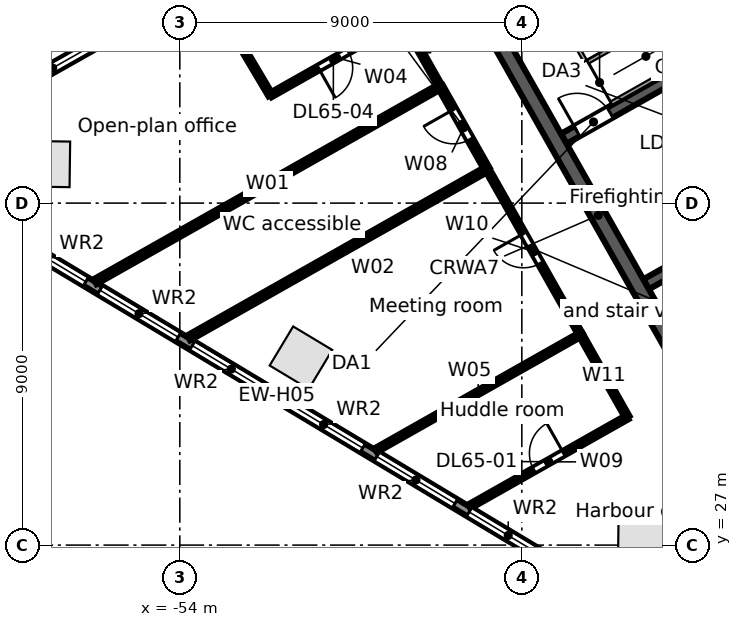
"""IFC4 building model, lengths in metres.
Left out: names, types, materials, properties, quantities, classifications, styles, units other than length and angle.
Written with IfcOpenShell. Run it as: python <this file> out.ifc"""

import sys

from ifc_helpers import new_model, si_unit, direction, frame, frame_2d, origin, origin_2d, place, context, subcontext, project, spatial, rectangle, extrude, element, fill, save


model = new_model("IFC4")
c1 = context("Model", 3, precision=1e-05, world=origin(), true_north=direction((0.0, 1.0)))
c2 = subcontext(c1, "Body", "Model", "MODEL_VIEW")
j1 = project(units=[si_unit("LENGTHUNIT", "METRE"), si_unit("PLANEANGLEUNIT", "RADIAN")], contexts=[c1])
p1 = place(None, origin())
s1 = spatial("IfcSite", under=j1, at=p1, CompositionType="ELEMENT")
p2 = place(p1, origin())
s2 = spatial("IfcBuilding", under=s1, at=p2, CompositionType="ELEMENT")
p3 = place(p2, frame((0.0, 0.0, 300.7)))
s3 = spatial("IfcBuildingStorey", under=s2, at=p3, CompositionType="ELEMENT", Elevation=300.7)
for number, where, z_axis, x_axis in (
    (1, (-57.493, 37.027, 0.0), (0.0, 0.0, 1.0), (-0.013, -1.0, 0.0)),
    (2, (-50.812, 31.931, 0.0), (0.0, 0.0, 1.0), (0.857, -0.515, 0.0)),
    (3, (-41.858, 27.495, 0.0), (0.0, 0.0, 1.0), (1.0, -0.013, 0.0)),
):
    element("IfcColumn", number, at=place(p3, frame(where, z_axis=z_axis, x_axis=x_axis)), inside=s3, PredefinedType="COLUMN", context=c2, shape_type="SweptSolid", body=[
        extrude(rectangle(XDim=1.2, YDim=1.2, at=origin_2d()), origin(), (0.0, 0.0, 1.0), 3.8),
    ])
p4 = place(p3, frame((-58.732, 38.771, 0.0), z_axis=(0.0, 0.0, 1.0), x_axis=(0.870355615581, 0.492423702137, 0.0)))
e4 = element("IfcWall", 4, at=p4, inside=s3, PredefinedType="STANDARD", context=c2, shape_type="SweptSolid", body=[
    extrude(rectangle(XDim=64.052, YDim=0.25, at=frame_2d((32.026, 0.0))), origin(), (0.0, 0.0, 1.0), 3.52),
])
p5 = place(p4, frame((61.259, 0.0, 0.8)))
e5 = element("IfcOpeningElement", 5, at=p5, cuts=e4, PredefinedType="OPENING", context=c2, shape_type="SweptSolid", body=[
    extrude(rectangle(XDim=2.4, YDim=2.2, at=frame_2d((1.2, 1.1))), frame((0.0, 0.135, 0.0), z_axis=(0.0, -1.0, 0.0), x_axis=(1.0, 0.0, 0.0)), (0.0, 0.0, 1.0), 0.27),
])
p6 = place(p4, frame((58.216, 0.0, 0.8)))
e6 = element("IfcOpeningElement", 6, at=p6, cuts=e4, PredefinedType="OPENING", context=c2, shape_type="SweptSolid", body=[
    extrude(rectangle(XDim=2.4, YDim=2.2, at=frame_2d((1.2, 1.1))), frame((0.0, 0.135, 0.0), z_axis=(0.0, -1.0, 0.0), x_axis=(1.0, 0.0, 0.0)), (0.0, 0.0, 1.0), 0.27),
])
p7 = place(p4, frame((55.173, 0.0, 0.8)))
e7 = element("IfcOpeningElement", 7, at=p7, cuts=e4, PredefinedType="OPENING", context=c2, shape_type="SweptSolid", body=[
    extrude(rectangle(XDim=2.4, YDim=2.2, at=frame_2d((1.2, 1.1))), frame((0.0, 0.135, 0.0), z_axis=(0.0, -1.0, 0.0), x_axis=(1.0, 0.0, 0.0)), (0.0, 0.0, 1.0), 0.27),
])
p8 = place(p4, frame((52.129, 0.0, 0.8)))
e8 = element("IfcOpeningElement", 8, at=p8, cuts=e4, PredefinedType="OPENING", context=c2, shape_type="SweptSolid", body=[
    extrude(rectangle(XDim=2.4, YDim=2.2, at=frame_2d((1.2, 1.1))), frame((0.0, 0.135, 0.0), z_axis=(0.0, -1.0, 0.0), x_axis=(1.0, 0.0, 0.0)), (0.0, 0.0, 1.0), 0.27),
])
p9 = place(p4, frame((49.086, 0.0, 0.8)))
e9 = element("IfcOpeningElement", 9, at=p9, cuts=e4, PredefinedType="OPENING", context=c2, shape_type="SweptSolid", body=[
    extrude(rectangle(XDim=2.4, YDim=2.2, at=frame_2d((1.2, 1.1))), frame((0.0, 0.135, 0.0), z_axis=(0.0, -1.0, 0.0), x_axis=(1.0, 0.0, 0.0)), (0.0, 0.0, 1.0), 0.27),
])
p10 = place(p4, frame((46.043, 0.0, 0.8)))
e10 = element("IfcOpeningElement", 10, at=p10, cuts=e4, PredefinedType="OPENING", context=c2, shape_type="SweptSolid", body=[
    extrude(rectangle(XDim=2.4, YDim=2.2, at=frame_2d((1.2, 1.1))), frame((0.0, 0.135, 0.0), z_axis=(0.0, -1.0, 0.0), x_axis=(1.0, 0.0, 0.0)), (0.0, 0.0, 1.0), 0.27),
])
p11 = place(p4, frame((43.0, 0.0, 0.8)))
e11 = element("IfcOpeningElement", 11, at=p11, cuts=e4, PredefinedType="OPENING", context=c2, shape_type="SweptSolid", body=[
    extrude(rectangle(XDim=2.4, YDim=2.2, at=frame_2d((1.2, 1.1))), frame((0.0, 0.135, 0.0), z_axis=(0.0, -1.0, 0.0), x_axis=(1.0, 0.0, 0.0)), (0.0, 0.0, 1.0), 0.27),
])
p12 = place(p4, frame((39.956, 0.0, 0.8)))
e12 = element("IfcOpeningElement", 12, at=p12, cuts=e4, PredefinedType="OPENING", context=c2, shape_type="SweptSolid", body=[
    extrude(rectangle(XDim=2.4, YDim=2.2, at=frame_2d((1.2, 1.1))), frame((0.0, 0.135, 0.0), z_axis=(0.0, -1.0, 0.0), x_axis=(1.0, 0.0, 0.0)), (0.0, 0.0, 1.0), 0.27),
])
p13 = place(p4, frame((36.913, 0.0, 0.8)))
e13 = element("IfcOpeningElement", 13, at=p13, cuts=e4, PredefinedType="OPENING", context=c2, shape_type="SweptSolid", body=[
    extrude(rectangle(XDim=2.4, YDim=2.2, at=frame_2d((1.2, 1.1))), frame((0.0, 0.135, 0.0), z_axis=(0.0, -1.0, 0.0), x_axis=(1.0, 0.0, 0.0)), (0.0, 0.0, 1.0), 0.27),
])
p14 = place(p4, frame((33.87, 0.0, 0.8)))
e14 = element("IfcOpeningElement", 14, at=p14, cuts=e4, PredefinedType="OPENING", context=c2, shape_type="SweptSolid", body=[
    extrude(rectangle(XDim=2.4, YDim=2.2, at=frame_2d((1.2, 1.1))), frame((0.0, 0.135, 0.0), z_axis=(0.0, -1.0, 0.0), x_axis=(1.0, 0.0, 0.0)), (0.0, 0.0, 1.0), 0.27),
])
p15 = place(p4, frame((30.826, 0.0, 0.8)))
e15 = element("IfcOpeningElement", 15, at=p15, cuts=e4, PredefinedType="OPENING", context=c2, shape_type="SweptSolid", body=[
    extrude(rectangle(XDim=2.4, YDim=2.2, at=frame_2d((1.2, 1.1))), frame((0.0, 0.135, 0.0), z_axis=(0.0, -1.0, 0.0), x_axis=(1.0, 0.0, 0.0)), (0.0, 0.0, 1.0), 0.27),
])
p16 = place(p4, frame((27.783, 0.0, 0.8)))
e16 = element("IfcOpeningElement", 16, at=p16, cuts=e4, PredefinedType="OPENING", context=c2, shape_type="SweptSolid", body=[
    extrude(rectangle(XDim=2.4, YDim=2.2, at=frame_2d((1.2, 1.1))), frame((0.0, 0.135, 0.0), z_axis=(0.0, -1.0, 0.0), x_axis=(1.0, 0.0, 0.0)), (0.0, 0.0, 1.0), 0.27),
])
p17 = place(p4, frame((24.74, 0.0, 0.8)))
e17 = element("IfcOpeningElement", 17, at=p17, cuts=e4, PredefinedType="OPENING", context=c2, shape_type="SweptSolid", body=[
    extrude(rectangle(XDim=2.4, YDim=2.2, at=frame_2d((1.2, 1.1))), frame((0.0, 0.135, 0.0), z_axis=(0.0, -1.0, 0.0), x_axis=(1.0, 0.0, 0.0)), (0.0, 0.0, 1.0), 0.27),
])
p18 = place(p4, frame((21.696, 0.0, 0.8)))
e18 = element("IfcOpeningElement", 18, at=p18, cuts=e4, PredefinedType="OPENING", context=c2, shape_type="SweptSolid", body=[
    extrude(rectangle(XDim=2.4, YDim=2.2, at=frame_2d((1.2, 1.1))), frame((0.0, 0.135, 0.0), z_axis=(0.0, -1.0, 0.0), x_axis=(1.0, 0.0, 0.0)), (0.0, 0.0, 1.0), 0.27),
])
p19 = place(p4, frame((18.653, 0.0, 0.8)))
e19 = element("IfcOpeningElement", 19, at=p19, cuts=e4, PredefinedType="OPENING", context=c2, shape_type="SweptSolid", body=[
    extrude(rectangle(XDim=2.4, YDim=2.2, at=frame_2d((1.2, 1.1))), frame((0.0, 0.135, 0.0), z_axis=(0.0, -1.0, 0.0), x_axis=(1.0, 0.0, 0.0)), (0.0, 0.0, 1.0), 0.27),
])
p20 = place(p4, frame((15.61, 0.0, 0.8)))
e20 = element("IfcOpeningElement", 20, at=p20, cuts=e4, PredefinedType="OPENING", context=c2, shape_type="SweptSolid", body=[
    extrude(rectangle(XDim=2.4, YDim=2.2, at=frame_2d((1.2, 1.1))), frame((0.0, 0.135, 0.0), z_axis=(0.0, -1.0, 0.0), x_axis=(1.0, 0.0, 0.0)), (0.0, 0.0, 1.0), 0.27),
])
p21 = place(p4, frame((12.567, 0.0, 0.8)))
e21 = element("IfcOpeningElement", 21, at=p21, cuts=e4, PredefinedType="OPENING", context=c2, shape_type="SweptSolid", body=[
    extrude(rectangle(XDim=2.4, YDim=2.2, at=frame_2d((1.2, 1.1))), frame((0.0, 0.135, 0.0), z_axis=(0.0, -1.0, 0.0), x_axis=(1.0, 0.0, 0.0)), (0.0, 0.0, 1.0), 0.27),
])
p22 = place(p4, frame((9.523, 0.0, 0.8)))
e22 = element("IfcOpeningElement", 22, at=p22, cuts=e4, PredefinedType="OPENING", context=c2, shape_type="SweptSolid", body=[
    extrude(rectangle(XDim=2.4, YDim=2.2, at=frame_2d((1.2, 1.1))), frame((0.0, 0.135, 0.0), z_axis=(0.0, -1.0, 0.0), x_axis=(1.0, 0.0, 0.0)), (0.0, 0.0, 1.0), 0.27),
])
p23 = place(p4, frame((6.48, 0.0, 0.8)))
e23 = element("IfcOpeningElement", 23, at=p23, cuts=e4, PredefinedType="OPENING", context=c2, shape_type="SweptSolid", body=[
    extrude(rectangle(XDim=2.4, YDim=2.2, at=frame_2d((1.2, 1.1))), frame((0.0, 0.135, 0.0), z_axis=(0.0, -1.0, 0.0), x_axis=(1.0, 0.0, 0.0)), (0.0, 0.0, 1.0), 0.27),
])
p24 = place(p4, frame((3.437, 0.0, 0.8)))
e24 = element("IfcOpeningElement", 24, at=p24, cuts=e4, PredefinedType="OPENING", context=c2, shape_type="SweptSolid", body=[
    extrude(rectangle(XDim=2.4, YDim=2.2, at=frame_2d((1.2, 1.1))), frame((0.0, 0.135, 0.0), z_axis=(0.0, -1.0, 0.0), x_axis=(1.0, 0.0, 0.0)), (0.0, 0.0, 1.0), 0.27),
])
p25 = place(p4, frame((0.393, 0.0, 0.8)))
e25 = element("IfcOpeningElement", 25, at=p25, cuts=e4, PredefinedType="OPENING", context=c2, shape_type="SweptSolid", body=[
    extrude(rectangle(XDim=2.4, YDim=2.2, at=frame_2d((1.2, 1.1))), frame((0.0, 0.135, 0.0), z_axis=(0.0, -1.0, 0.0), x_axis=(1.0, 0.0, 0.0)), (0.0, 0.0, 1.0), 0.27),
])
p26 = place(p3, frame((-44.115, 26.507, 0.0), z_axis=(0.0, 0.0, 1.0), x_axis=(-0.857166583633, 0.515039268311, 0.0)))
e26 = element("IfcWall", 26, at=p26, inside=s3, PredefinedType="STANDARD", context=c2, shape_type="SweptSolid", body=[
    extrude(rectangle(XDim=17.106, YDim=0.25, at=frame_2d((8.553, 0.0))), origin(), (0.0, 0.0, 1.0), 3.52),
])
p27 = place(p26, frame((14.417, 0.0, 0.8)))
e27 = element("IfcOpeningElement", 27, at=p27, cuts=e26, PredefinedType="OPENING", context=c2, shape_type="SweptSolid", body=[
    extrude(rectangle(XDim=2.4, YDim=2.2, at=frame_2d((1.2, 1.1))), frame((0.0, 0.135, 0.0), z_axis=(0.0, -1.0, 0.0), x_axis=(1.0, 0.0, 0.0)), (0.0, 0.0, 1.0), 0.27),
])
p28 = place(p26, frame((11.584, 0.0, 0.8)))
e28 = element("IfcOpeningElement", 28, at=p28, cuts=e26, PredefinedType="OPENING", context=c2, shape_type="SweptSolid", body=[
    extrude(rectangle(XDim=2.4, YDim=2.2, at=frame_2d((1.2, 1.1))), frame((0.0, 0.135, 0.0), z_axis=(0.0, -1.0, 0.0), x_axis=(1.0, 0.0, 0.0)), (0.0, 0.0, 1.0), 0.27),
])
p29 = place(p26, frame((8.75, 0.0, 0.8)))
e29 = element("IfcOpeningElement", 29, at=p29, cuts=e26, PredefinedType="OPENING", context=c2, shape_type="SweptSolid", body=[
    extrude(rectangle(XDim=2.4, YDim=2.2, at=frame_2d((1.2, 1.1))), frame((0.0, 0.135, 0.0), z_axis=(0.0, -1.0, 0.0), x_axis=(1.0, 0.0, 0.0)), (0.0, 0.0, 1.0), 0.27),
])
p30 = place(p26, frame((5.917, 0.0, 0.8)))
e30 = element("IfcOpeningElement", 30, at=p30, cuts=e26, PredefinedType="OPENING", context=c2, shape_type="SweptSolid", body=[
    extrude(rectangle(XDim=2.4, YDim=2.2, at=frame_2d((1.2, 1.1))), frame((0.0, 0.135, 0.0), z_axis=(0.0, -1.0, 0.0), x_axis=(1.0, 0.0, 0.0)), (0.0, 0.0, 1.0), 0.27),
])
p31 = place(p26, frame((3.084, 0.0, 0.8)))
e31 = element("IfcOpeningElement", 31, at=p31, cuts=e26, PredefinedType="OPENING", context=c2, shape_type="SweptSolid", body=[
    extrude(rectangle(XDim=2.4, YDim=2.2, at=frame_2d((1.2, 1.1))), frame((0.0, 0.135, 0.0), z_axis=(0.0, -1.0, 0.0), x_axis=(1.0, 0.0, 0.0)), (0.0, 0.0, 1.0), 0.27),
])
p32 = place(p26, frame((0.25, 0.0, 0.8)))
e32 = element("IfcOpeningElement", 32, at=p32, cuts=e26, PredefinedType="OPENING", context=c2, shape_type="SweptSolid", body=[
    extrude(rectangle(XDim=2.4, YDim=2.2, at=frame_2d((1.2, 1.1))), frame((0.0, 0.135, 0.0), z_axis=(0.0, -1.0, 0.0), x_axis=(1.0, 0.0, 0.0)), (0.0, 0.0, 1.0), 0.27),
])
p33 = place(p3, frame((-41.73, 33.863, 0.0), z_axis=(0.0, 0.0, 1.0), x_axis=(0.870350800578, 0.492432212525, 0.0)))
e33 = element("IfcWall", 33, at=p33, inside=s3, PredefinedType="SOLIDWALL", context=c2, shape_type="SweptSolid", body=[
    extrude(rectangle(XDim=6.2, YDim=0.3, at=frame_2d((3.1, 0.0))), origin(), (0.0, 0.0, 1.0), 3.52),
])
p34 = place(p33, frame((1.3, 0.0, 0.0)))
e34 = element("IfcOpeningElement", 34, at=p34, cuts=e33, PredefinedType="OPENING", context=c2, shape_type="SweptSolid", body=[
    extrude(rectangle(XDim=1.1, YDim=2.1, at=frame_2d((0.55, 1.05))), frame((0.0, 0.16, 0.0), z_axis=(0.0, -1.0, 0.0), x_axis=(1.0, 0.0, 0.0)), (0.0, 0.0, 1.0), 0.32),
])
p35 = place(p33, frame((4.95, 0.0, 0.0)))
e35 = element("IfcOpeningElement", 35, at=p35, cuts=e33, PredefinedType="OPENING", context=c2, shape_type="SweptSolid", body=[
    extrude(rectangle(XDim=0.9, YDim=2.1, at=frame_2d((0.45, 1.05))), frame((0.0, 0.16, 0.0), z_axis=(0.0, -1.0, 0.0), x_axis=(1.0, 0.0, 0.0)), (0.0, 0.0, 1.0), 0.32),
])
p36 = place(p3, frame((-43.897, 37.692, 0.0), z_axis=(0.0, 0.0, 1.0), x_axis=(0.870356351998, 0.492422400523, 0.0)))
e36 = element("IfcWall", 36, at=p36, inside=s3, PredefinedType="SOLIDWALL", context=c2, shape_type="SweptSolid", body=[
    extrude(rectangle(XDim=7.6, YDim=0.3, at=frame_2d((3.8, 0.0))), origin(), (0.0, 0.0, 1.0), 3.52),
])
p37 = place(p36, frame((0.4, 0.0, 0.0)))
e37 = element("IfcOpeningElement", 37, at=p37, cuts=e36, PredefinedType="OPENING", context=c2, shape_type="SweptSolid", body=[
    extrude(rectangle(XDim=1.0, YDim=2.1, at=frame_2d((0.5, 1.05))), frame((0.0, 0.16, 0.0), z_axis=(0.0, -1.0, 0.0), x_axis=(1.0, 0.0, 0.0)), (0.0, 0.0, 1.0), 0.32),
])
p38 = place(p3, frame((-46.238, 41.423, 0.0), z_axis=(0.0, 0.0, 1.0), x_axis=(0.492421663121, -0.870356769198, 0.0)))
e38 = element("IfcWall", 38, at=p38, inside=s3, PredefinedType="SOLIDWALL", context=c2, shape_type="SweptSolid", body=[
    extrude(rectangle(XDim=13.2, YDim=0.4, at=frame_2d((6.6, 0.0))), origin(), (0.0, 0.0, 1.0), 3.52),
])
p39 = place(p3, frame((-56.229, 33.932, 0.0), z_axis=(0.0, 0.0, 1.0), x_axis=(0.870363189886, 0.492410314364, 0.0)))
e39 = element("IfcWall", 39, at=p39, inside=s3, PredefinedType="PARTITIONING", context=c2, shape_type="SweptSolid", body=[
    extrude(rectangle(XDim=10.435, YDim=0.15, at=frame_2d((5.217, 0.0))), origin(), (0.0, 0.0, 1.0), 2.8),
])
p40 = place(p3, frame((-53.767, 32.453, 0.0), z_axis=(0.0, 0.0, 1.0), x_axis=(0.870345499828, 0.492441581235, 0.0)))
e40 = element("IfcWall", 40, at=p40, inside=s3, PredefinedType="PARTITIONING", context=c2, shape_type="SweptSolid", body=[
    extrude(rectangle(XDim=9.021, YDim=0.15, at=frame_2d((4.51, 0.0))), origin(), (0.0, 0.0, 1.0), 2.8),
])
p41 = place(p3, frame((-53.309, 41.696, 0.0), z_axis=(0.0, 0.0, 1.0), x_axis=(0.510739180143, -0.859735709312, 0.0)))
e41 = element("IfcWall", 41, at=p41, inside=s3, PredefinedType="PARTITIONING", context=c2, shape_type="SweptSolid", body=[
    extrude(rectangle(XDim=3.321, YDim=0.125, at=frame_2d((1.66, 0.0))), origin(), (0.0, 0.0, 1.0), 2.894),
])
p42 = place(p3, frame((-51.613, 38.841, 0.0), z_axis=(0.0, 0.0, 1.0), x_axis=(0.870297830159, 0.492525823506, 0.0)))
e42 = element("IfcWall", 42, at=p42, inside=s3, PredefinedType="PARTITIONING", context=c2, shape_type="SweptSolid", body=[
    extrude(rectangle(XDim=4.0, YDim=0.125, at=frame_2d((2.0, 0.0))), origin(), (0.0, 0.0, 1.0), 2.8),
])
p43 = place(p42, frame((1.45, 0.0, 0.0)))
e43 = element("IfcOpeningElement", 43, at=p43, cuts=e42, PredefinedType="OPENING", context=c2, shape_type="SweptSolid", body=[
    extrude(rectangle(XDim=0.9, YDim=2.1, at=frame_2d((0.45, 1.05))), frame((0.0, 0.073, 0.0), z_axis=(0.0, -1.0, 0.0), x_axis=(1.0, 0.0, 0.0)), (0.0, 0.0, 1.0), 0.145),
])
p44 = place(p3, frame((-48.843, 29.494, 0.0), z_axis=(0.0, 0.0, 1.0), x_axis=(0.870343909083, 0.492444392721, 0.0)))
e44 = element("IfcWall", 44, at=p44, inside=s3, PredefinedType="PARTITIONING", context=c2, shape_type="SweptSolid", body=[
    extrude(rectangle(XDim=6.192, YDim=0.125, at=frame_2d((3.096, 0.0))), origin(), (0.0, 0.0, 1.0), 2.8),
])
p45 = place(p3, frame((-48.132, 40.811, 0.0), z_axis=(0.0, 0.0, 1.0), x_axis=(0.492467412326, -0.870330884088, 0.0)))
e45 = element("IfcWall", 45, at=p45, inside=s3, PredefinedType="PARTITIONING", context=c2, shape_type="SweptSolid", body=[
    extrude(rectangle(XDim=2.0, YDim=0.125, at=frame_2d((1.0, 0.0))), origin(), (0.0, 0.0, 1.0), 3.52),
])
p46 = place(p3, frame((-47.147, 39.07, 0.0), z_axis=(0.0, 0.0, 1.0), x_axis=(0.492536798944, -0.870291618761, 0.0)))
e46 = element("IfcWall", 46, at=p46, inside=s3, PredefinedType="PARTITIONING", context=c2, shape_type="SweptSolid", body=[
    extrude(rectangle(XDim=2.499, YDim=0.15, at=frame_2d((1.25, 0.0))), origin(), (0.0, 0.0, 1.0), 3.52),
])
p47 = place(p46, frame((0.7, 0.0, 0.0)))
e47 = element("IfcOpeningElement", 47, at=p47, cuts=e46, PredefinedType="OPENING", context=c2, shape_type="SweptSolid", body=[
    extrude(rectangle(XDim=0.9, YDim=2.1, at=frame_2d((0.45, 1.05))), frame((0.0, 0.085, 0.0), z_axis=(0.0, -1.0, 0.0), x_axis=(1.0, 0.0, 0.0)), (0.0, 0.0, 1.0), 0.17),
])
p48 = place(p3, frame((-46.381, 28.015, 0.0), z_axis=(0.0, 0.0, 1.0), x_axis=(0.870404795821, 0.49233676626, 0.0)))
e48 = element("IfcWall", 48, at=p48, inside=s3, PredefinedType="PARTITIONING", context=c2, shape_type="SweptSolid", body=[
    extrude(rectangle(XDim=4.777, YDim=0.125, at=frame_2d((2.389, 0.0))), origin(), (0.0, 0.0, 1.0), 2.8),
])
p49 = place(p48, frame((1.95, 0.0, 0.0)))
e49 = element("IfcOpeningElement", 49, at=p49, cuts=e48, PredefinedType="OPENING", context=c2, shape_type="SweptSolid", body=[
    extrude(rectangle(XDim=0.9, YDim=2.1, at=frame_2d((0.45, 1.05))), frame((0.0, 0.073, 0.0), z_axis=(0.0, -1.0, 0.0), x_axis=(1.0, 0.0, 0.0)), (0.0, 0.0, 1.0), 0.145),
])
p50 = place(p3, frame((-45.916, 36.895, 0.0), z_axis=(0.0, 0.0, 1.0), x_axis=(0.492369352746, -0.870386362759, 0.0)))
e50 = element("IfcWall", 50, at=p50, inside=s3, PredefinedType="PARTITIONING", context=c2, shape_type="SweptSolid", body=[
    extrude(rectangle(XDim=5.0, YDim=0.125, at=frame_2d((2.5, 0.0))), origin(), (0.0, 0.0, 1.0), 2.8),
])
p51 = place(p50, frame((1.95, 0.0, 0.0)))
e51 = element("IfcOpeningElement", 51, at=p51, cuts=e50, PredefinedType="OPENING", context=c2, shape_type="SweptSolid", body=[
    extrude(rectangle(XDim=0.9, YDim=2.1, at=frame_2d((0.45, 1.05))), frame((0.0, 0.073, 0.0), z_axis=(0.0, -1.0, 0.0), x_axis=(1.0, 0.0, 0.0)), (0.0, 0.0, 1.0), 0.145),
])
p52 = place(p3, frame((-43.454, 32.543, 0.0), z_axis=(0.0, 0.0, 1.0), x_axis=(0.49244332707, -0.870344512032, 0.0)))
e52 = element("IfcWall", 52, at=p52, inside=s3, PredefinedType="PARTITIONING", context=c2, shape_type="SweptSolid", body=[
    extrude(rectangle(XDim=2.5, YDim=0.125, at=frame_2d((1.25, 0.0))), origin(), (0.0, 0.0, 1.0), 3.52),
])
p53 = place(p25, origin())
e53 = element("IfcWindow", 53, at=p53, inside=s3, PartitioningType="SINGLE_PANEL", PredefinedType="WINDOW", context=c2, shape_type="SweptSolid", body=[
    extrude(rectangle(XDim=2.4, YDim=2.2, at=frame_2d((1.2, 1.1))), frame((0.0, 0.03, 0.0), z_axis=(0.0, -1.0, 0.0), x_axis=(1.0, 0.0, 0.0)), (0.0, 0.0, 1.0), 0.06),
])
fill(e25, e53)
p54 = place(p27, origin())
e54 = element("IfcWindow", 54, at=p54, inside=s3, PartitioningType="SINGLE_PANEL", PredefinedType="WINDOW", context=c2, shape_type="SweptSolid", body=[
    extrude(rectangle(XDim=2.4, YDim=2.2, at=frame_2d((1.2, 1.1))), frame((0.0, 0.03, 0.0), z_axis=(0.0, -1.0, 0.0), x_axis=(1.0, 0.0, 0.0)), (0.0, 0.0, 1.0), 0.06),
])
fill(e27, e54)
p55 = place(p28, origin())
e55 = element("IfcWindow", 55, at=p55, inside=s3, PartitioningType="SINGLE_PANEL", PredefinedType="WINDOW", context=c2, shape_type="SweptSolid", body=[
    extrude(rectangle(XDim=2.4, YDim=2.2, at=frame_2d((1.2, 1.1))), frame((0.0, 0.03, 0.0), z_axis=(0.0, -1.0, 0.0), x_axis=(1.0, 0.0, 0.0)), (0.0, 0.0, 1.0), 0.06),
])
fill(e28, e55)
p56 = place(p29, origin())
e56 = element("IfcWindow", 56, at=p56, inside=s3, PartitioningType="SINGLE_PANEL", PredefinedType="WINDOW", context=c2, shape_type="SweptSolid", body=[
    extrude(rectangle(XDim=2.4, YDim=2.2, at=frame_2d((1.2, 1.1))), frame((0.0, 0.03, 0.0), z_axis=(0.0, -1.0, 0.0), x_axis=(1.0, 0.0, 0.0)), (0.0, 0.0, 1.0), 0.06),
])
fill(e29, e56)
p57 = place(p30, origin())
e57 = element("IfcWindow", 57, at=p57, inside=s3, PartitioningType="SINGLE_PANEL", PredefinedType="WINDOW", context=c2, shape_type="SweptSolid", body=[
    extrude(rectangle(XDim=2.4, YDim=2.2, at=frame_2d((1.2, 1.1))), frame((0.0, 0.03, 0.0), z_axis=(0.0, -1.0, 0.0), x_axis=(1.0, 0.0, 0.0)), (0.0, 0.0, 1.0), 0.06),
])
fill(e30, e57)
p58 = place(p31, origin())
e58 = element("IfcWindow", 58, at=p58, inside=s3, PartitioningType="SINGLE_PANEL", PredefinedType="WINDOW", context=c2, shape_type="SweptSolid", body=[
    extrude(rectangle(XDim=2.4, YDim=2.2, at=frame_2d((1.2, 1.1))), frame((0.0, 0.03, 0.0), z_axis=(0.0, -1.0, 0.0), x_axis=(1.0, 0.0, 0.0)), (0.0, 0.0, 1.0), 0.06),
])
fill(e31, e58)
p59 = place(p32, origin())
e59 = element("IfcWindow", 59, at=p59, inside=s3, PartitioningType="SINGLE_PANEL", PredefinedType="WINDOW", context=c2, shape_type="SweptSolid", body=[
    extrude(rectangle(XDim=2.4, YDim=2.2, at=frame_2d((1.2, 1.1))), frame((0.0, 0.03, 0.0), z_axis=(0.0, -1.0, 0.0), x_axis=(1.0, 0.0, 0.0)), (0.0, 0.0, 1.0), 0.06),
])
fill(e32, e59)
p60 = place(p37, origin())
e60 = element("IfcDoor", 60, at=p60, inside=s3, OperationType="SINGLE_SWING_LEFT", PredefinedType="DOOR", context=c2, shape_type="SweptSolid", body=[
    extrude(rectangle(XDim=1.0, YDim=2.1, at=frame_2d((0.5, 1.05))), frame((0.0, 0.025, 0.0), z_axis=(0.0, -1.0, 0.0), x_axis=(1.0, 0.0, 0.0)), (0.0, 0.0, 1.0), 0.05),
])
fill(e37, e60)
p61 = place(p49, origin())
e61 = element("IfcDoor", 61, at=p61, inside=s3, OperationType="SINGLE_SWING_RIGHT", PredefinedType="DOOR", context=c2, shape_type="SweptSolid", body=[
    extrude(rectangle(XDim=0.9, YDim=2.1, at=frame_2d((0.45, 1.05))), frame((0.0, 0.025, 0.0), z_axis=(0.0, -1.0, 0.0), x_axis=(1.0, 0.0, 0.0)), (0.0, 0.0, 1.0), 0.05),
])
fill(e49, e61)
p62 = place(p51, frame((0.9, 0.0, 0.0), z_axis=(0.0, 0.0, 1.0), x_axis=(-1.0, 0.0, 0.0)))
e62 = element("IfcDoor", 62, at=p62, inside=s3, OperationType="SINGLE_SWING_RIGHT", PredefinedType="DOOR", context=c2, shape_type="SweptSolid", body=[
    extrude(rectangle(XDim=0.9, YDim=2.1, at=frame_2d((0.45, 1.05))), frame((0.0, 0.025, 0.0), z_axis=(0.0, -1.0, 0.0), x_axis=(1.0, 0.0, 0.0)), (0.0, 0.0, 1.0), 0.05),
])
fill(e51, e62)
p63 = place(p47, frame((0.9, 0.0, 0.0), z_axis=(0.0, 0.0, 1.0), x_axis=(-1.0, 0.0, 0.0)))
e63 = element("IfcDoor", 63, at=p63, inside=s3, OperationType="SINGLE_SWING_RIGHT", PredefinedType="DOOR", context=c2, shape_type="SweptSolid", body=[
    extrude(rectangle(XDim=0.9, YDim=2.1, at=frame_2d((0.45, 1.05))), frame((0.0, 0.025, 0.0), z_axis=(0.0, -1.0, 0.0), x_axis=(1.0, 0.0, 0.0)), (0.0, 0.0, 1.0), 0.05),
])
fill(e47, e63)
p64 = place(p43, frame((0.9, 0.0, 0.0), z_axis=(0.0, 0.0, 1.0), x_axis=(-1.0, 0.0, 0.0)))
e64 = element("IfcDoor", 64, at=p64, inside=s3, OperationType="SINGLE_SWING_RIGHT", PredefinedType="DOOR", context=c2, shape_type="SweptSolid", body=[
    extrude(rectangle(XDim=0.9, YDim=2.1, at=frame_2d((0.45, 1.05))), frame((0.0, 0.025, 0.0), z_axis=(0.0, -1.0, 0.0), x_axis=(1.0, 0.0, 0.0)), (0.0, 0.0, 1.0), 0.05),
])
fill(e43, e64)
save(model, sys.argv[1])
